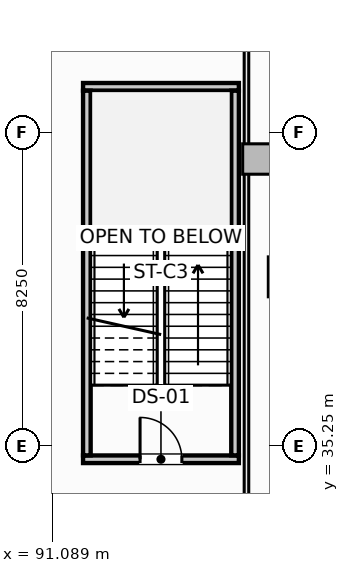
"""IFC4 building model, lengths in metres.
Left out: names, types, materials, properties, quantities, classifications, styles, units other than length and angle.
Written with IfcOpenShell. Run it as: python <this file> out.ifc"""

import sys

from ifc_helpers import new_model, si_unit, direction, frame, frame_2d, origin, origin_2d, place, context, subcontext, project, spatial, rectangle, extrude, element, fill, save


model = new_model("IFC4")
c1 = context("Model", 3, precision=1e-05, world=origin(), true_north=direction((0.0, 1.0)))
c2 = subcontext(c1, "Body", "Model", "MODEL_VIEW")
j1 = project(units=[si_unit("LENGTHUNIT", "METRE"), si_unit("PLANEANGLEUNIT", "RADIAN")], contexts=[c1])
p1 = place(None, origin())
s1 = spatial("IfcSite", under=j1, at=p1, CompositionType="ELEMENT")
p2 = place(p1, origin())
s2 = spatial("IfcBuilding", under=s1, at=p2, CompositionType="ELEMENT")
p3 = place(p2, frame((0.0, 0.0, -4.5)))
s3 = spatial("IfcBuildingStorey", under=s2, at=p3, CompositionType="ELEMENT", Elevation=-4.5)
p4 = place(p3, frame((97.3, 39.7, -0.32), z_axis=(0.0, 0.0, 1.0), x_axis=(1.0, 0.0, 0.0)))
e1 = element("IfcColumn", 1, at=p4, inside=s3, PredefinedType="COLUMN", context=c2, shape_type="SweptSolid", body=[
    extrude(rectangle(XDim=1.05, YDim=1.05, at=origin_2d()), origin(), (0.0, 0.0, 1.0), 4.46),
])
p5 = place(p3, frame((96.5, 42.8, -0.32), z_axis=(0.0, 0.0, 1.0), x_axis=(1.0, 0.0, 0.0)))
e2 = element("IfcColumn", 2, at=p5, inside=s3, PredefinedType="PILASTER", context=c2, shape_type="SweptSolid", body=[
    extrude(rectangle(XDim=0.8, YDim=0.8, at=origin_2d()), origin(), (0.0, 0.0, 1.0), 4.46),
])
p6 = place(p3, frame((91.9, 34.9, -0.32), z_axis=(0.0, 0.0, 1.0), x_axis=(1.0, 0.0, 0.0)))
e3 = element("IfcWall", 3, at=p6, inside=s3, PredefinedType="SHEAR", context=c2, shape_type="SweptSolid", body=[
    extrude(rectangle(XDim=4.1, YDim=0.2, at=frame_2d((2.05, 0.0))), origin(), (0.0, 0.0, 1.0), 4.46),
])
p7 = place(p6, frame((1.5, 0.0, 0.32)))
e4 = element("IfcOpeningElement", 4, at=p7, cuts=e3, PredefinedType="OPENING", context=c2, shape_type="SweptSolid", body=[
    extrude(rectangle(XDim=1.1, YDim=2.15, at=frame_2d((0.55, 1.075))), frame((0.0, 0.11, 0.0), z_axis=(0.0, -1.0, 0.0), x_axis=(1.0, 0.0, 0.0)), (0.0, 0.0, 1.0), 0.22),
])
p8 = place(p3, frame((91.9, 44.7, -0.32), z_axis=(0.0, 0.0, 1.0), x_axis=(1.0, 0.0, 0.0)))
e5 = element("IfcWall", 5, at=p8, inside=s3, PredefinedType="SHEAR", context=c2, shape_type="SweptSolid", body=[
    extrude(rectangle(XDim=4.1, YDim=0.2, at=frame_2d((2.05, 0.0))), origin(), (0.0, 0.0, 1.0), 4.46),
])
for number, where, z_axis, x_axis in (
    (6, (92.0, 35.002, -0.32), (0.0, 0.0, 1.0), (0.0, 1.0, 0.0)),
    (7, (95.9, 35.002, -0.32), (0.0, 0.0, 1.0), (0.0, 1.0, 0.0)),
):
    element("IfcWall", number, at=place(p3, frame(where, z_axis=z_axis, x_axis=x_axis)), inside=s3, PredefinedType="SHEAR", context=c2, shape_type="SweptSolid", body=[
        extrude(rectangle(XDim=9.596, YDim=0.2, at=frame_2d((4.798, 0.0))), origin(), (0.0, 0.0, 1.0), 4.46),
    ])
p9 = place(p3, frame((96.2, 6.612, 0.0), z_axis=(0.0, 0.0, 1.0), x_axis=(0.0, 1.0, 0.0)))
e8 = element("IfcWall", 8, at=p9, inside=s3, PredefinedType="PARTITIONING", context=c2, shape_type="SweptSolid", body=[
    extrude(rectangle(XDim=39.976, YDim=0.12, at=frame_2d((19.988, 0.0))), origin(), (0.0, 0.0, 1.0), 4.14),
])
p10 = place(p7, origin())
e9 = element("IfcDoor", 9, at=p10, inside=s3, OperationType="SINGLE_SWING_LEFT", PredefinedType="DOOR", context=c2, shape_type="SweptSolid", body=[
    extrude(rectangle(XDim=1.1, YDim=2.15, at=frame_2d((0.55, 1.075))), frame((0.0, 0.025, 0.0), z_axis=(0.0, -1.0, 0.0), x_axis=(1.0, 0.0, 0.0)), (0.0, 0.0, 1.0), 0.05),
])
fill(e4, e9)
save(model, sys.argv[1])
